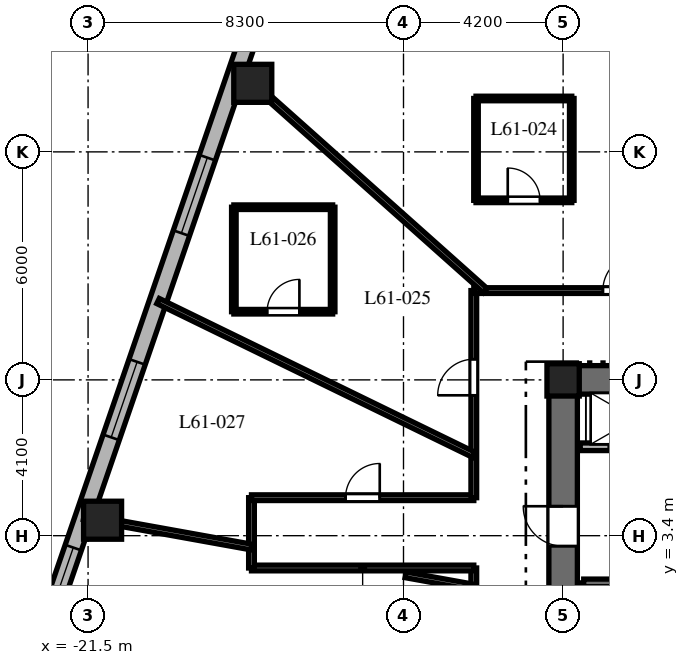
"""IFC4 building model, lengths in metres.
Left out: names, types, materials, properties, quantities, classifications, styles, units other than length and angle.
Written with IfcOpenShell. Run it as: python <this file> out.ifc"""

import sys

from ifc_helpers import new_model, si_unit, direction, frame, frame_2d, origin, origin_2d, place, context, subcontext, project, spatial, rectangle, extrude, element, fill, save


model = new_model("IFC4")
c1 = context("Model", 3, precision=1e-05, world=origin(), true_north=direction((0.0, 1.0)))
c2 = subcontext(c1, "Body", "Model", "MODEL_VIEW")
j1 = project(units=[si_unit("LENGTHUNIT", "METRE"), si_unit("PLANEANGLEUNIT", "RADIAN")], contexts=[c1])
p1 = place(None, origin())
s1 = spatial("IfcSite", under=j1, at=p1, CompositionType="ELEMENT")
p2 = place(p1, origin())
s2 = spatial("IfcBuilding", under=s1, at=p2, CompositionType="ELEMENT")
p3 = place(p2, frame((0.0, 0.0, 244.5)))
s3 = spatial("IfcBuildingStorey", under=s2, at=p3, CompositionType="ELEMENT", Elevation=244.5)
p4 = place(p3, frame((-9.375, 7.5, 0.0), z_axis=(0.0, 0.0, 1.0), x_axis=(1.0, 0.0, 0.0)))
e1 = element("IfcWall", 1, at=p4, inside=s3, PredefinedType="SHEAR", context=c2, shape_type="SweptSolid", body=[
    extrude(rectangle(XDim=9.425, YDim=0.75, at=frame_2d((4.712, 0.0))), origin(), (0.0, 0.0, 1.0), 3.8),
])
p5 = place(p3, frame((-9.0, -7.125, 0.0), z_axis=(0.0, 0.0, 1.0), x_axis=(0.0, 1.0, 0.0)))
e2 = element("IfcWall", 2, at=p5, inside=s3, PredefinedType="SHEAR", context=c2, shape_type="SweptSolid", body=[
    extrude(rectangle(XDim=14.25, YDim=0.75, at=frame_2d((7.125, 0.0))), origin(), (0.0, 0.0, 1.0), 3.8),
])
p6 = place(p5, frame((10.25, 0.0, 0.0)))
e3 = element("IfcOpeningElement", 3, at=p6, cuts=e2, PredefinedType="OPENING", context=c2, shape_type="SweptSolid", body=[
    extrude(rectangle(XDim=1.05, YDim=2.15, at=frame_2d((0.525, 1.075))), frame((0.0, 0.385, 0.0), z_axis=(0.0, -1.0, 0.0), x_axis=(1.0, 0.0, 0.0)), (0.0, 0.0, 1.0), 0.77),
])
p7 = place(p3, frame((-8.458, -6.985, 0.0), z_axis=(0.0, 0.0, 1.0), x_axis=(0.0, 1.0, 0.0)))
e4 = element("IfcWall", 4, at=p7, inside=s3, PredefinedType="SHEAR", context=c2, shape_type="SweptSolid", body=[
    extrude(rectangle(XDim=9.143, YDim=0.2, at=frame_2d((4.572, 0.0))), origin(), (0.0, 0.0, 1.0), 3.8),
])
p8 = place(p3, frame((-8.458, 2.158, 0.0), z_axis=(0.0, 0.0, 1.0), x_axis=(1.0, 0.0, 0.0)))
e5 = element("IfcWall", 5, at=p8, inside=s3, PredefinedType="SHEAR", context=c2, shape_type="SweptSolid", body=[
    extrude(rectangle(XDim=3.686, YDim=0.2, at=frame_2d((1.843, 0.0))), origin(), (0.0, 0.0, 1.0), 3.8),
])
p9 = place(p8, frame((1.3, 0.0, 0.0)))
e6 = element("IfcOpeningElement", 6, at=p9, cuts=e5, PredefinedType="OPENING", context=c2, shape_type="SweptSolid", body=[
    extrude(rectangle(XDim=1.0, YDim=2.15, at=frame_2d((0.5, 1.075))), frame((0.0, 0.11, 0.0), z_axis=(0.0, -1.0, 0.0), x_axis=(1.0, 0.0, 0.0)), (0.0, 0.0, 1.0), 0.22),
])
p10 = place(p3, frame((-9.0, 7.5, 0.0), z_axis=(0.0, 0.0, 1.0), x_axis=(1.0, 0.0, 0.0)))
e7 = element("IfcColumn", 7, at=p10, inside=s3, PredefinedType="COLUMN", context=c2, shape_type="SweptSolid", body=[
    extrude(rectangle(XDim=0.85, YDim=0.85, at=origin_2d()), origin(), (0.0, 0.0, 1.0), 3.8),
])
for number, where, z_axis, x_axis in (
    (8, (-17.166, 15.304, 0.0), (0.0, 0.0, 1.0), (1.0, 0.0, 0.0)),
    (9, (-21.118, 3.807, 0.0), (0.0, 0.0, 1.0), (1.0, 0.0, 0.0)),
):
    element("IfcColumn", number, at=place(p3, frame(where, z_axis=z_axis, x_axis=x_axis)), inside=s3, PredefinedType="COLUMN", context=c2, shape_type="SweptSolid", body=[
        extrude(rectangle(XDim=1.0, YDim=1.0, at=origin_2d()), origin(), (0.0, 0.0, 1.0), 3.8),
    ])
p11 = place(p3, frame((-16.324, 19.275, 0.0), z_axis=(0.0, 0.0, 1.0), x_axis=(-0.325083142304, -0.945685439557, 0.0)))
e10 = element("IfcWall", 10, at=p11, inside=s3, PredefinedType="SOLIDWALL", context=c2, shape_type="SweptSolid", body=[
    extrude(rectangle(XDim=20.224, YDim=0.45, at=frame_2d((10.112, 0.0))), origin(), (0.0, 0.0, 1.0), 3.5),
])
p12 = place(p11, frame((0.953, 0.0, 0.8)))
e11 = element("IfcOpeningElement", 11, at=p12, cuts=e10, PredefinedType="OPENING", context=c2, shape_type="SweptSolid", body=[
    extrude(rectangle(XDim=2.1, YDim=1.85, at=frame_2d((1.05, 0.925))), frame((0.0, 0.235, 0.0), z_axis=(0.0, -1.0, 0.0), x_axis=(1.0, 0.0, 0.0)), (0.0, 0.0, 1.0), 0.47),
])
p13 = place(p11, frame((6.268, 0.0, 0.8)))
e12 = element("IfcOpeningElement", 12, at=p13, cuts=e10, PredefinedType="OPENING", context=c2, shape_type="SweptSolid", body=[
    extrude(rectangle(XDim=2.1, YDim=1.85, at=frame_2d((1.05, 0.925))), frame((0.0, 0.235, 0.0), z_axis=(0.0, -1.0, 0.0), x_axis=(1.0, 0.0, 0.0)), (0.0, 0.0, 1.0), 0.47),
])
p14 = place(p11, frame((11.95, 0.0, 0.8)))
e13 = element("IfcOpeningElement", 13, at=p14, cuts=e10, PredefinedType="OPENING", context=c2, shape_type="SweptSolid", body=[
    extrude(rectangle(XDim=2.1, YDim=1.85, at=frame_2d((1.05, 0.925))), frame((0.0, 0.235, 0.0), z_axis=(0.0, -1.0, 0.0), x_axis=(1.0, 0.0, 0.0)), (0.0, 0.0, 1.0), 0.47),
])
p15 = place(p11, frame((17.118, 0.0, 0.8)))
e14 = element("IfcOpeningElement", 14, at=p15, cuts=e10, PredefinedType="OPENING", context=c2, shape_type="SweptSolid", body=[
    extrude(rectangle(XDim=2.1, YDim=1.85, at=frame_2d((1.05, 0.925))), frame((0.0, 0.235, 0.0), z_axis=(0.0, -1.0, 0.0), x_axis=(1.0, 0.0, 0.0)), (0.0, 0.0, 1.0), 0.47),
])
p16 = place(p3, frame((-8.55, 5.74, 0.0), z_axis=(0.0, 0.0, 1.0), x_axis=(1.0, 0.0, 0.0)))
e15 = element("IfcWall", 15, at=p16, inside=s3, PredefinedType="PARTITIONING", context=c2, shape_type="SweptSolid", body=[
    extrude(rectangle(XDim=4.05, YDim=0.2, at=frame_2d((2.025, 0.0))), origin(), (0.0, 0.0, 1.0), 3.5),
])
p17 = place(p16, frame((0.75, 0.0, 0.0)))
e16 = element("IfcOpeningElement", 16, at=p17, cuts=e15, PredefinedType="OPENING", context=c2, shape_type="SweptSolid", body=[
    extrude(rectangle(XDim=1.1, YDim=2.2, at=frame_2d((0.55, 1.1))), frame((0.0, 0.11, 0.0), z_axis=(0.0, -1.0, 0.0), x_axis=(1.0, 0.0, 0.0)), (0.0, 0.0, 1.0), 0.22),
])
p18 = place(p16, frame((2.9, 0.0, 0.0)))
e17 = element("IfcOpeningElement", 17, at=p18, cuts=e15, PredefinedType="OPENING", context=c2, shape_type="SweptSolid", body=[
    extrude(rectangle(XDim=0.85, YDim=2.03, at=frame_2d((0.425, 1.015))), frame((0.0, 0.11, 0.0), z_axis=(0.0, -1.0, 0.0), x_axis=(1.0, 0.0, 0.0)), (0.0, 0.0, 1.0), 0.22),
])
p19 = place(p3, frame((-11.35, -9.85, 0.0), z_axis=(0.0, 0.0, 1.0), x_axis=(0.0, 1.0, 0.0)))
e18 = element("IfcWall", 18, at=p19, inside=s3, PredefinedType="PARTITIONING", context=c2, shape_type="SweptSolid", body=[
    extrude(rectangle(XDim=12.4, YDim=0.15, at=frame_2d((6.2, 0.0))), origin(), (0.0, 0.0, 1.0), 2.99),
])
p20 = place(p19, frame((8.835, 0.0, 0.0)))
e19 = element("IfcOpeningElement", 19, at=p20, cuts=e18, PredefinedType="OPENING", context=c2, shape_type="SweptSolid", body=[
    extrude(rectangle(XDim=0.95, YDim=2.03, at=frame_2d((0.475, 1.015))), frame((0.0, 0.085, 0.0), z_axis=(0.0, -1.0, 0.0), x_axis=(1.0, 0.0, 0.0)), (0.0, 0.0, 1.0), 0.17),
])
p21 = place(p19, frame((4.709, 0.0, 0.0)))
e20 = element("IfcOpeningElement", 20, at=p21, cuts=e18, PredefinedType="OPENING", context=c2, shape_type="SweptSolid", body=[
    extrude(rectangle(XDim=0.9, YDim=2.03, at=frame_2d((0.45, 1.015))), frame((0.0, 0.085, 0.0), z_axis=(0.0, -1.0, 0.0), x_axis=(1.0, 0.0, 0.0)), (0.0, 0.0, 1.0), 0.17),
])
p22 = place(p19, frame((1.457, 0.0, 0.0)))
e21 = element("IfcOpeningElement", 21, at=p22, cuts=e18, PredefinedType="OPENING", context=c2, shape_type="SweptSolid", body=[
    extrude(rectangle(XDim=0.95, YDim=2.03, at=frame_2d((0.475, 1.015))), frame((0.0, 0.085, 0.0), z_axis=(0.0, -1.0, 0.0), x_axis=(1.0, 0.0, 0.0)), (0.0, 0.0, 1.0), 0.17),
])
p23 = place(p3, frame((-11.35, 2.55, 0.0), z_axis=(0.0, 0.0, 1.0), x_axis=(-1.0, 0.0, 0.0)))
e22 = element("IfcWall", 22, at=p23, inside=s3, PredefinedType="PARTITIONING", context=c2, shape_type="SweptSolid", body=[
    extrude(rectangle(XDim=5.85, YDim=0.15, at=frame_2d((2.925, 0.0))), origin(), (0.0, 0.0, 1.0), 2.94),
])
p24 = place(p3, frame((-17.2, 2.55, 0.0), z_axis=(0.0, 0.0, 1.0), x_axis=(0.0, 1.0, 0.0)))
e23 = element("IfcWall", 23, at=p24, inside=s3, PredefinedType="PARTITIONING", context=c2, shape_type="SweptSolid", body=[
    extrude(rectangle(XDim=1.85, YDim=0.15, at=frame_2d((0.925, 0.0))), origin(), (0.0, 0.0, 1.0), 2.94),
])
p25 = place(p3, frame((-17.2, 4.4, 0.0), z_axis=(0.0, 0.0, 1.0), x_axis=(1.0, 0.0, 0.0)))
e24 = element("IfcWall", 24, at=p25, inside=s3, PredefinedType="PARTITIONING", context=c2, shape_type="SweptSolid", body=[
    extrude(rectangle(XDim=5.85, YDim=0.15, at=frame_2d((2.925, 0.0))), origin(), (0.0, 0.0, 1.0), 2.94),
])
p26 = place(p25, frame((2.475, 0.0, 0.0)))
e25 = element("IfcOpeningElement", 25, at=p26, cuts=e24, PredefinedType="OPENING", context=c2, shape_type="SweptSolid", body=[
    extrude(rectangle(XDim=0.9, YDim=2.03, at=frame_2d((0.45, 1.015))), frame((0.0, 0.085, 0.0), z_axis=(0.0, -1.0, 0.0), x_axis=(1.0, 0.0, 0.0)), (0.0, 0.0, 1.0), 0.17),
])
p27 = place(p3, frame((-11.35, 4.4, 0.0), z_axis=(0.0, 0.0, 1.0), x_axis=(0.0, 1.0, 0.0)))
e26 = element("IfcWall", 26, at=p27, inside=s3, PredefinedType="PARTITIONING", context=c2, shape_type="SweptSolid", body=[
    extrude(rectangle(XDim=5.45, YDim=0.15, at=frame_2d((2.725, 0.0))), origin(), (0.0, 0.0, 1.0), 2.99),
])
p28 = place(p27, frame((2.694, 0.0, 0.0)))
e27 = element("IfcOpeningElement", 27, at=p28, cuts=e26, PredefinedType="OPENING", context=c2, shape_type="SweptSolid", body=[
    extrude(rectangle(XDim=0.95, YDim=2.03, at=frame_2d((0.475, 1.015))), frame((0.0, 0.085, 0.0), z_axis=(0.0, -1.0, 0.0), x_axis=(1.0, 0.0, 0.0)), (0.0, 0.0, 1.0), 0.17),
])
p29 = place(p3, frame((-11.35, 9.85, 0.0), z_axis=(0.0, 0.0, 1.0), x_axis=(1.0, 0.0, 0.0)))
e28 = element("IfcWall", 28, at=p29, inside=s3, PredefinedType="PARTITIONING", context=c2, shape_type="SweptSolid", body=[
    extrude(rectangle(XDim=10.43, YDim=0.15, at=frame_2d((5.215, 0.0))), origin(), (0.0, 0.0, 1.0), 2.99),
])
p30 = place(p29, frame((8.362, 0.0, 0.0)))
e29 = element("IfcOpeningElement", 29, at=p30, cuts=e28, PredefinedType="OPENING", context=c2, shape_type="SweptSolid", body=[
    extrude(rectangle(XDim=0.95, YDim=2.03, at=frame_2d((0.475, 1.015))), frame((0.0, 0.085, 0.0), z_axis=(0.0, -1.0, 0.0), x_axis=(1.0, 0.0, 0.0)), (0.0, 0.0, 1.0), 0.17),
])
p31 = place(p29, frame((3.396, 0.0, 0.0)))
e30 = element("IfcOpeningElement", 30, at=p31, cuts=e28, PredefinedType="OPENING", context=c2, shape_type="SweptSolid", body=[
    extrude(rectangle(XDim=0.95, YDim=2.03, at=frame_2d((0.475, 1.015))), frame((0.0, 0.085, 0.0), z_axis=(0.0, -1.0, 0.0), x_axis=(1.0, 0.0, 0.0)), (0.0, 0.0, 1.0), 0.17),
])
p32 = place(p3, frame((-3.848, 9.85, 0.0), z_axis=(0.0, 0.0, 1.0), x_axis=(-0.363921778212, 0.931429513889, 0.0)))
e31 = element("IfcWall", 31, at=p32, inside=s3, PredefinedType="PARTITIONING", context=c2, shape_type="SweptSolid", body=[
    extrude(rectangle(XDim=12.588, YDim=0.15, at=frame_2d((6.294, 0.0))), origin(), (0.0, 0.0, 1.0), 2.74),
])
p33 = place(p3, frame((-11.048, 9.85, 0.0), z_axis=(0.0, 0.0, 1.0), x_axis=(-0.746444434655, 0.665447748492, 0.0)))
e32 = element("IfcWall", 32, at=p33, inside=s3, PredefinedType="PARTITIONING", context=c2, shape_type="SweptSolid", body=[
    extrude(rectangle(XDim=8.732, YDim=0.15, at=frame_2d((4.366, 0.0))), origin(), (0.0, 0.0, 1.0), 2.74),
])
p34 = place(p3, frame((-11.35, 5.528, 0.0), z_axis=(0.0, 0.0, 1.0), x_axis=(-0.899038669565, 0.437869239188, 0.0)))
e33 = element("IfcWall", 33, at=p34, inside=s3, PredefinedType="PARTITIONING", context=c2, shape_type="SweptSolid", body=[
    extrude(rectangle(XDim=9.242, YDim=0.15, at=frame_2d((4.621, 0.0))), origin(), (0.0, 0.0, 1.0), 2.74),
])
p35 = place(p3, frame((-11.35, 2.046, 0.0), z_axis=(0.0, 0.0, 1.0), x_axis=(-0.984127783205, 0.177461281195, 0.0)))
e34 = element("IfcWall", 34, at=p35, inside=s3, PredefinedType="PARTITIONING", context=c2, shape_type="SweptSolid", body=[
    extrude(rectangle(XDim=1.826, YDim=0.15, at=frame_2d((0.913, 0.0))), origin(), (0.0, 0.0, 1.0), 3.5),
])
p36 = place(p3, frame((-17.2, 3.101, 0.0), z_axis=(0.0, 0.0, 1.0), x_axis=(-0.98413465883, 0.177423147559, 0.0)))
e35 = element("IfcWall", 35, at=p36, inside=s3, PredefinedType="PARTITIONING", context=c2, shape_type="SweptSolid", body=[
    extrude(rectangle(XDim=4.482, YDim=0.15, at=frame_2d((2.241, 0.0))), origin(), (0.0, 0.0, 1.0), 2.74),
])
p37 = place(p3, frame((-11.292, 12.225, 0.0), z_axis=(0.0, 0.0, 1.0), x_axis=(1.0, 0.0, 0.0)))
e36 = element("IfcWall", 36, at=p37, inside=s3, PredefinedType="PARTITIONING", context=c2, shape_type="SweptSolid", body=[
    extrude(rectangle(XDim=2.52, YDim=0.12, at=frame_2d((1.26, 0.0))), origin(), (0.0, 0.0, 1.0), 2.99),
])
p38 = place(p37, frame((0.835, 0.0, 0.0)))
e37 = element("IfcOpeningElement", 37, at=p38, cuts=e36, PredefinedType="OPENING", context=c2, shape_type="SweptSolid", body=[
    extrude(rectangle(XDim=0.85, YDim=2.03, at=frame_2d((0.425, 1.015))), frame((0.0, 0.07, 0.0), z_axis=(0.0, -1.0, 0.0), x_axis=(1.0, 0.0, 0.0)), (0.0, 0.0, 1.0), 0.14),
])
p39 = place(p3, frame((-8.772, 12.225, 0.0), z_axis=(0.0, 0.0, 1.0), x_axis=(0.0, 1.0, 0.0)))
e38 = element("IfcWall", 38, at=p39, inside=s3, PredefinedType="PARTITIONING", context=c2, shape_type="SweptSolid", body=[
    extrude(rectangle(XDim=2.68, YDim=0.12, at=frame_2d((1.34, 0.0))), origin(), (0.0, 0.0, 1.0), 2.99),
])
p40 = place(p3, frame((-8.772, 14.905, 0.0), z_axis=(0.0, 0.0, 1.0), x_axis=(-1.0, 0.0, 0.0)))
e39 = element("IfcWall", 39, at=p40, inside=s3, PredefinedType="PARTITIONING", context=c2, shape_type="SweptSolid", body=[
    extrude(rectangle(XDim=2.52, YDim=0.12, at=frame_2d((1.26, 0.0))), origin(), (0.0, 0.0, 1.0), 3.027),
])
p41 = place(p3, frame((-11.292, 14.905, 0.0), z_axis=(0.0, 0.0, 1.0), x_axis=(0.0, -1.0, 0.0)))
e40 = element("IfcWall", 40, at=p41, inside=s3, PredefinedType="PARTITIONING", context=c2, shape_type="SweptSolid", body=[
    extrude(rectangle(XDim=2.68, YDim=0.12, at=frame_2d((1.34, 0.0))), origin(), (0.0, 0.0, 1.0), 3.027),
])
p42 = place(p3, frame((-17.664, 9.294, 0.0), z_axis=(0.0, 0.0, 1.0), x_axis=(1.0, 0.0, 0.0)))
e41 = element("IfcWall", 41, at=p42, inside=s3, PredefinedType="PARTITIONING", context=c2, shape_type="SweptSolid", body=[
    extrude(rectangle(XDim=2.6, YDim=0.12, at=frame_2d((1.3, 0.0))), origin(), (0.0, 0.0, 1.0), 3.073),
])
p43 = place(p42, frame((0.875, 0.0, 0.0)))
e42 = element("IfcOpeningElement", 42, at=p43, cuts=e41, PredefinedType="OPENING", context=c2, shape_type="SweptSolid", body=[
    extrude(rectangle(XDim=0.85, YDim=2.03, at=frame_2d((0.425, 1.015))), frame((0.0, 0.07, 0.0), z_axis=(0.0, -1.0, 0.0), x_axis=(1.0, 0.0, 0.0)), (0.0, 0.0, 1.0), 0.14),
])
p44 = place(p3, frame((-15.064, 9.294, 0.0), z_axis=(0.0, 0.0, 1.0), x_axis=(0.0, 1.0, 0.0)))
e43 = element("IfcWall", 43, at=p44, inside=s3, PredefinedType="PARTITIONING", context=c2, shape_type="SweptSolid", body=[
    extrude(rectangle(XDim=2.75, YDim=0.12, at=frame_2d((1.375, 0.0))), origin(), (0.0, 0.0, 1.0), 3.073),
])
p45 = place(p3, frame((-15.064, 12.044, 0.0), z_axis=(0.0, 0.0, 1.0), x_axis=(-1.0, 0.0, 0.0)))
e44 = element("IfcWall", 44, at=p45, inside=s3, PredefinedType="PARTITIONING", context=c2, shape_type="SweptSolid", body=[
    extrude(rectangle(XDim=2.6, YDim=0.12, at=frame_2d((1.3, 0.0))), origin(), (0.0, 0.0, 1.0), 3.5),
])
p46 = place(p3, frame((-17.664, 12.044, 0.0), z_axis=(0.0, 0.0, 1.0), x_axis=(0.0, -1.0, 0.0)))
e45 = element("IfcWall", 45, at=p46, inside=s3, PredefinedType="PARTITIONING", context=c2, shape_type="SweptSolid", body=[
    extrude(rectangle(XDim=2.75, YDim=0.12, at=frame_2d((1.375, 0.0))), origin(), (0.0, 0.0, 1.0), 3.5),
])
p47 = place(p13, origin())
e46 = element("IfcWindow", 46, at=p47, inside=s3, PartitioningType="SINGLE_PANEL", PredefinedType="WINDOW", context=c2, shape_type="SweptSolid", body=[
    extrude(rectangle(XDim=2.1, YDim=1.85, at=frame_2d((1.05, 0.925))), frame((0.0, 0.03, 0.0), z_axis=(0.0, -1.0, 0.0), x_axis=(1.0, 0.0, 0.0)), (0.0, 0.0, 1.0), 0.06),
])
fill(e12, e46)
p48 = place(p14, origin())
e47 = element("IfcWindow", 47, at=p48, inside=s3, PartitioningType="SINGLE_PANEL", PredefinedType="WINDOW", context=c2, shape_type="SweptSolid", body=[
    extrude(rectangle(XDim=2.1, YDim=1.85, at=frame_2d((1.05, 0.925))), frame((0.0, 0.03, 0.0), z_axis=(0.0, -1.0, 0.0), x_axis=(1.0, 0.0, 0.0)), (0.0, 0.0, 1.0), 0.06),
])
fill(e13, e47)
p49 = place(p15, origin())
e48 = element("IfcWindow", 48, at=p49, inside=s3, PartitioningType="SINGLE_PANEL", PredefinedType="WINDOW", context=c2, shape_type="SweptSolid", body=[
    extrude(rectangle(XDim=2.1, YDim=1.85, at=frame_2d((1.05, 0.925))), frame((0.0, 0.03, 0.0), z_axis=(0.0, -1.0, 0.0), x_axis=(1.0, 0.0, 0.0)), (0.0, 0.0, 1.0), 0.06),
])
fill(e14, e48)
p50 = place(p6, origin())
e49 = element("IfcDoor", 49, at=p50, inside=s3, OperationType="SINGLE_SWING_RIGHT", PredefinedType="DOOR", context=c2, shape_type="SweptSolid", body=[
    extrude(rectangle(XDim=1.05, YDim=2.15, at=frame_2d((0.525, 1.075))), frame((0.0, 0.025, 0.0), z_axis=(0.0, -1.0, 0.0), x_axis=(1.0, 0.0, 0.0)), (0.0, 0.0, 1.0), 0.05),
])
fill(e3, e49)
p51 = place(p17, origin())
e50 = element("IfcDoor", 50, at=p51, inside=s3, OperationType="SLIDING_TO_LEFT", PredefinedType="DOOR", context=c2, shape_type="SweptSolid", body=[
    extrude(rectangle(XDim=1.1, YDim=2.2, at=frame_2d((0.55, 1.1))), frame((0.0, 0.025, 0.0), z_axis=(0.0, -1.0, 0.0), x_axis=(1.0, 0.0, 0.0)), (0.0, 0.0, 1.0), 0.05),
])
fill(e16, e50)
p52 = place(p31, origin())
e51 = element("IfcDoor", 51, at=p52, inside=s3, OperationType="SINGLE_SWING_RIGHT", PredefinedType="DOOR", context=c2, shape_type="SweptSolid", body=[
    extrude(rectangle(XDim=0.95, YDim=2.03, at=frame_2d((0.475, 1.015))), frame((0.0, 0.025, 0.0), z_axis=(0.0, -1.0, 0.0), x_axis=(1.0, 0.0, 0.0)), (0.0, 0.0, 1.0), 0.05),
])
fill(e30, e51)
p53 = place(p38, origin())
e52 = element("IfcDoor", 52, at=p53, inside=s3, OperationType="SINGLE_SWING_LEFT", PredefinedType="DOOR", context=c2, shape_type="SweptSolid", body=[
    extrude(rectangle(XDim=0.85, YDim=2.03, at=frame_2d((0.425, 1.015))), frame((0.0, 0.025, 0.0), z_axis=(0.0, -1.0, 0.0), x_axis=(1.0, 0.0, 0.0)), (0.0, 0.0, 1.0), 0.05),
])
fill(e37, e52)
p54 = place(p28, origin())
e53 = element("IfcDoor", 53, at=p54, inside=s3, OperationType="SINGLE_SWING_LEFT", PredefinedType="DOOR", context=c2, shape_type="SweptSolid", body=[
    extrude(rectangle(XDim=0.95, YDim=2.03, at=frame_2d((0.475, 1.015))), frame((0.0, 0.025, 0.0), z_axis=(0.0, -1.0, 0.0), x_axis=(1.0, 0.0, 0.0)), (0.0, 0.0, 1.0), 0.05),
])
fill(e27, e53)
p55 = place(p43, origin())
e54 = element("IfcDoor", 54, at=p55, inside=s3, OperationType="SINGLE_SWING_RIGHT", PredefinedType="DOOR", context=c2, shape_type="SweptSolid", body=[
    extrude(rectangle(XDim=0.85, YDim=2.03, at=frame_2d((0.425, 1.015))), frame((0.0, 0.025, 0.0), z_axis=(0.0, -1.0, 0.0), x_axis=(1.0, 0.0, 0.0)), (0.0, 0.0, 1.0), 0.05),
])
fill(e42, e54)
p56 = place(p26, origin())
e55 = element("IfcDoor", 55, at=p56, inside=s3, OperationType="SINGLE_SWING_RIGHT", PredefinedType="DOOR", context=c2, shape_type="SweptSolid", body=[
    extrude(rectangle(XDim=0.9, YDim=2.03, at=frame_2d((0.45, 1.015))), frame((0.0, 0.025, 0.0), z_axis=(0.0, -1.0, 0.0), x_axis=(1.0, 0.0, 0.0)), (0.0, 0.0, 1.0), 0.05),
])
fill(e25, e55)
save(model, sys.argv[1])
